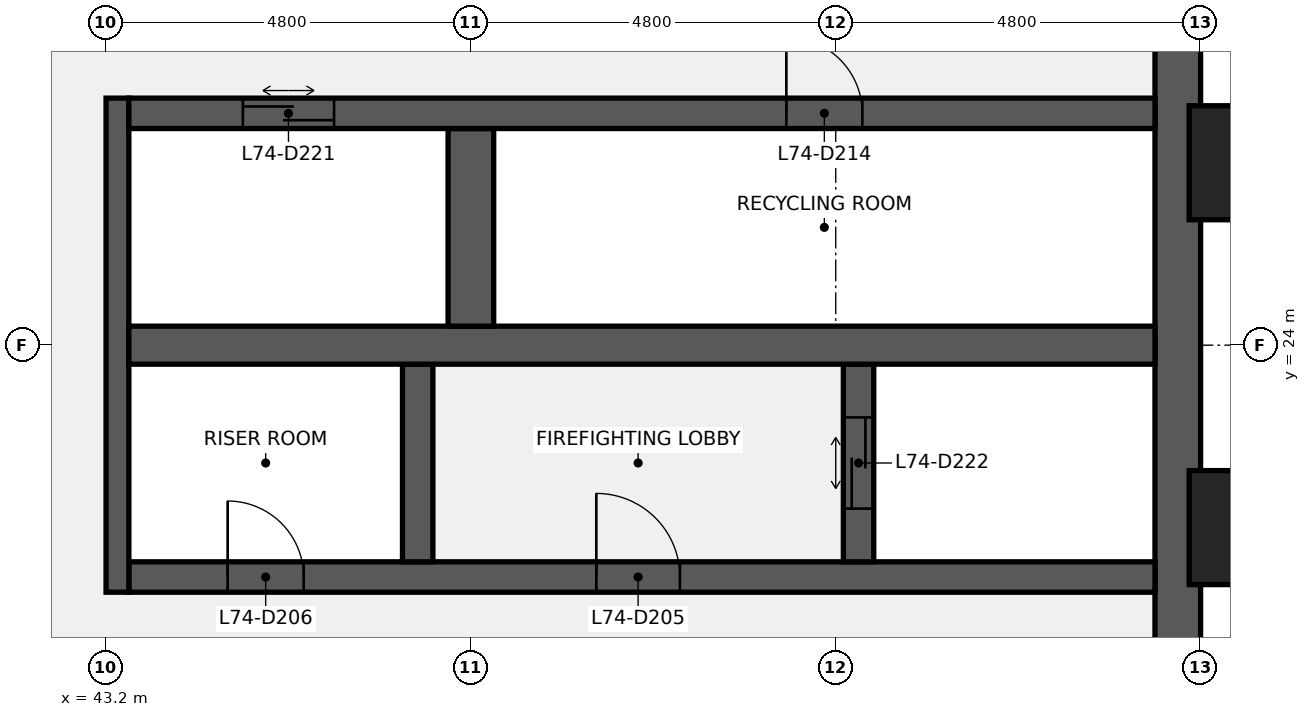
"""IFC4 building model, lengths in metres.
Left out: names, types, materials, properties, quantities, classifications, styles, units other than length and angle.
Written with IfcOpenShell. Run it as: python <this file> out.ifc"""

import sys

from ifc_helpers import new_model, si_unit, direction, frame, frame_2d, origin, origin_2d, place, context, subcontext, project, spatial, rectangle, extrude, element, fill, save


model = new_model("IFC4")
c1 = context("Model", 3, precision=1e-05, world=origin(), true_north=direction((0.0, 1.0)))
c2 = subcontext(c1, "Body", "Model", "MODEL_VIEW")
j1 = project(units=[si_unit("LENGTHUNIT", "METRE"), si_unit("PLANEANGLEUNIT", "RADIAN")], contexts=[c1])
p1 = place(None, origin())
s1 = spatial("IfcSite", under=j1, at=p1, CompositionType="ELEMENT")
p2 = place(p1, origin())
s2 = spatial("IfcBuilding", under=s1, at=p2, CompositionType="ELEMENT")
p3 = place(p2, frame((0.0, 0.0, 334.3)))
s3 = spatial("IfcBuildingStorey", under=s2, at=p3, CompositionType="ELEMENT", Elevation=334.3)
p4 = place(p3, frame((57.3, 38.4, 0.0), z_axis=(0.0, 0.0, 1.0), x_axis=(0.0, -1.0, 0.0)))
e1 = element("IfcWall", 1, at=p4, inside=s3, PredefinedType="SHEAR", context=c2, shape_type="SweptSolid", body=[
    extrude(rectangle(XDim=28.8, YDim=0.6, at=frame_2d((14.4, 0.0))), origin(), (0.0, 0.0, 1.0), 3.84),
])
p5 = place(p4, frame((18.45, 0.0, 0.9)))
e2 = element("IfcOpeningElement", 2, at=p5, cuts=e1, PredefinedType="OPENING", context=c2, shape_type="SweptSolid", body=[
    extrude(rectangle(XDim=1.5, YDim=1.5, at=frame_2d((0.75, 0.75))), frame((0.0, 0.31, 0.0), z_axis=(0.0, -1.0, 0.0), x_axis=(1.0, 0.0, 0.0)), (0.0, 0.0, 1.0), 0.62),
])
p6 = place(p4, frame((8.85, 0.0, 0.9)))
e3 = element("IfcOpeningElement", 3, at=p6, cuts=e1, PredefinedType="OPENING", context=c2, shape_type="SweptSolid", body=[
    extrude(rectangle(XDim=1.5, YDim=1.5, at=frame_2d((0.75, 0.75))), frame((0.0, 0.31, 0.0), z_axis=(0.0, -1.0, 0.0), x_axis=(1.0, 0.0, 0.0)), (0.0, 0.0, 1.0), 0.62),
])
p7 = place(p3, frame((43.5, 20.95, 0.0), z_axis=(0.0, 0.0, 1.0), x_axis=(1.0, 0.0, 0.0)))
e4 = element("IfcWall", 4, at=p7, inside=s3, PredefinedType="SHEAR", context=c2, shape_type="SweptSolid", body=[
    extrude(rectangle(XDim=13.5, YDim=0.4, at=frame_2d((6.75, 0.0))), origin(), (0.0, 0.0, 1.0), 3.84),
])
p8 = place(p7, frame((6.15, 0.0, 0.0)))
e5 = element("IfcOpeningElement", 5, at=p8, cuts=e4, PredefinedType="OPENING", context=c2, shape_type="SweptSolid", body=[
    extrude(rectangle(XDim=1.1, YDim=2.1, at=frame_2d((0.55, 1.05))), frame((0.0, 0.21, 0.0), z_axis=(0.0, -1.0, 0.0), x_axis=(1.0, 0.0, 0.0)), (0.0, 0.0, 1.0), 0.42),
])
p9 = place(p7, frame((1.3, 0.0, 0.0)))
e6 = element("IfcOpeningElement", 6, at=p9, cuts=e4, PredefinedType="OPENING", context=c2, shape_type="SweptSolid", body=[
    extrude(rectangle(XDim=1.0, YDim=2.1, at=frame_2d((0.5, 1.05))), frame((0.0, 0.21, 0.0), z_axis=(0.0, -1.0, 0.0), x_axis=(1.0, 0.0, 0.0)), (0.0, 0.0, 1.0), 0.42),
])
p10 = place(p3, frame((43.35, 20.75, 0.0), z_axis=(0.0, 0.0, 1.0), x_axis=(0.0, 1.0, 0.0)))
e7 = element("IfcWall", 7, at=p10, inside=s3, PredefinedType="SHEAR", context=c2, shape_type="SweptSolid", body=[
    extrude(rectangle(XDim=6.5, YDim=0.3, at=frame_2d((3.25, 0.0))), origin(), (0.0, 0.0, 1.0), 3.84),
])
p11 = place(p3, frame((53.1, 21.15, 0.0), z_axis=(0.0, 0.0, 1.0), x_axis=(0.0, 1.0, 0.0)))
e8 = element("IfcWall", 8, at=p11, inside=s3, PredefinedType="SHEAR", context=c2, shape_type="SweptSolid", body=[
    extrude(rectangle(XDim=2.6, YDim=0.4, at=frame_2d((1.3, 0.0))), origin(), (0.0, 0.0, 1.0), 3.84),
])
p12 = place(p11, frame((0.7, 0.0, 0.0)))
e9 = element("IfcOpeningElement", 9, at=p12, cuts=e8, PredefinedType="OPENING", context=c2, shape_type="SweptSolid", body=[
    extrude(rectangle(XDim=1.2, YDim=2.1, at=frame_2d((0.6, 1.05))), frame((0.0, 0.21, 0.0), z_axis=(0.0, -1.0, 0.0), x_axis=(1.0, 0.0, 0.0)), (0.0, 0.0, 1.0), 0.42),
])
p13 = place(p3, frame((47.3, 21.15, 0.0), z_axis=(0.0, 0.0, 1.0), x_axis=(0.0, 1.0, 0.0)))
e10 = element("IfcWall", 10, at=p13, inside=s3, PredefinedType="SHEAR", context=c2, shape_type="SweptSolid", body=[
    extrude(rectangle(XDim=2.6, YDim=0.4, at=frame_2d((1.3, 0.0))), origin(), (0.0, 0.0, 1.0), 3.84),
])
p14 = place(p3, frame((43.5, 24.0, 0.0), z_axis=(0.0, 0.0, 1.0), x_axis=(1.0, 0.0, 0.0)))
e11 = element("IfcWall", 11, at=p14, inside=s3, PredefinedType="SHEAR", context=c2, shape_type="SweptSolid", body=[
    extrude(rectangle(XDim=13.5, YDim=0.5, at=frame_2d((6.75, 0.0))), origin(), (0.0, 0.0, 1.0), 3.84),
])
p15 = place(p3, frame((48.0, 24.25, 0.0), z_axis=(0.0, 0.0, 1.0), x_axis=(0.0, 1.0, 0.0)))
e12 = element("IfcWall", 12, at=p15, inside=s3, PredefinedType="SHEAR", context=c2, shape_type="SweptSolid", body=[
    extrude(rectangle(XDim=2.6, YDim=0.6, at=frame_2d((1.3, 0.0))), origin(), (0.0, 0.0, 1.0), 3.84),
])
p16 = place(p3, frame((43.5, 27.05, 0.0), z_axis=(0.0, 0.0, 1.0), x_axis=(1.0, 0.0, 0.0)))
e13 = element("IfcWall", 13, at=p16, inside=s3, PredefinedType="SHEAR", context=c2, shape_type="SweptSolid", body=[
    extrude(rectangle(XDim=13.5, YDim=0.4, at=frame_2d((6.75, 0.0))), origin(), (0.0, 0.0, 1.0), 3.84),
])
p17 = place(p16, frame((8.65, 0.0, 0.0)))
e14 = element("IfcOpeningElement", 14, at=p17, cuts=e13, PredefinedType="OPENING", context=c2, shape_type="SweptSolid", body=[
    extrude(rectangle(XDim=1.0, YDim=2.1, at=frame_2d((0.5, 1.05))), frame((0.0, 0.21, 0.0), z_axis=(0.0, -1.0, 0.0), x_axis=(1.0, 0.0, 0.0)), (0.0, 0.0, 1.0), 0.42),
])
p18 = place(p16, frame((1.5, 0.0, 0.0)))
e15 = element("IfcOpeningElement", 15, at=p18, cuts=e13, PredefinedType="OPENING", context=c2, shape_type="SweptSolid", body=[
    extrude(rectangle(XDim=1.2, YDim=2.1, at=frame_2d((0.6, 1.05))), frame((0.0, 0.21, 0.0), z_axis=(0.0, -1.0, 0.0), x_axis=(1.0, 0.0, 0.0)), (0.0, 0.0, 1.0), 0.42),
])
for number, where, z_axis, x_axis in (
    (16, (58.35, 21.6, 0.0), (0.0, 0.0, 1.0), (0.0, 1.0, 0.0)),
    (17, (58.35, 26.4, 0.0), (0.0, 0.0, 1.0), (0.0, 1.0, 0.0)),
):
    element("IfcColumn", number, at=place(p3, frame(where, z_axis=z_axis, x_axis=x_axis)), inside=s3, PredefinedType="PILASTER", context=c2, shape_type="SweptSolid", body=[
        extrude(rectangle(XDim=1.8, YDim=1.5, at=origin_2d()), origin(), (0.0, 0.0, 1.0), 4.0),
    ])
p19 = place(p8, origin())
e18 = element("IfcDoor", 18, at=p19, inside=s3, OperationType="SINGLE_SWING_LEFT", PredefinedType="DOOR", context=c2, shape_type="SweptSolid", body=[
    extrude(rectangle(XDim=1.1, YDim=2.1, at=frame_2d((0.55, 1.05))), frame((0.0, 0.025, 0.0), z_axis=(0.0, -1.0, 0.0), x_axis=(1.0, 0.0, 0.0)), (0.0, 0.0, 1.0), 0.05),
])
fill(e5, e18)
p20 = place(p9, origin())
e19 = element("IfcDoor", 19, at=p20, inside=s3, OperationType="SINGLE_SWING_LEFT", PredefinedType="DOOR", context=c2, shape_type="SweptSolid", body=[
    extrude(rectangle(XDim=1.0, YDim=2.1, at=frame_2d((0.5, 1.05))), frame((0.0, 0.025, 0.0), z_axis=(0.0, -1.0, 0.0), x_axis=(1.0, 0.0, 0.0)), (0.0, 0.0, 1.0), 0.05),
])
fill(e6, e19)
p21 = place(p17, origin())
e20 = element("IfcDoor", 20, at=p21, inside=s3, OperationType="SINGLE_SWING_LEFT", PredefinedType="DOOR", context=c2, shape_type="SweptSolid", body=[
    extrude(rectangle(XDim=1.0, YDim=2.1, at=frame_2d((0.5, 1.05))), frame((0.0, 0.025, 0.0), z_axis=(0.0, -1.0, 0.0), x_axis=(1.0, 0.0, 0.0)), (0.0, 0.0, 1.0), 0.05),
])
fill(e14, e20)
p22 = place(p18, origin())
e21 = element("IfcDoor", 21, at=p22, inside=s3, OperationType="DOUBLE_DOOR_SLIDING", PredefinedType="DOOR", context=c2, shape_type="SweptSolid", body=[
    extrude(rectangle(XDim=1.2, YDim=2.1, at=frame_2d((0.6, 1.05))), frame((0.0, 0.025, 0.0), z_axis=(0.0, -1.0, 0.0), x_axis=(1.0, 0.0, 0.0)), (0.0, 0.0, 1.0), 0.05),
])
fill(e15, e21)
p23 = place(p12, origin())
e22 = element("IfcDoor", 22, at=p23, inside=s3, OperationType="DOUBLE_DOOR_SLIDING", PredefinedType="DOOR", context=c2, shape_type="SweptSolid", body=[
    extrude(rectangle(XDim=1.2, YDim=2.1, at=frame_2d((0.6, 1.05))), frame((0.0, 0.025, 0.0), z_axis=(0.0, -1.0, 0.0), x_axis=(1.0, 0.0, 0.0)), (0.0, 0.0, 1.0), 0.05),
])
fill(e9, e22)
save(model, sys.argv[1])
